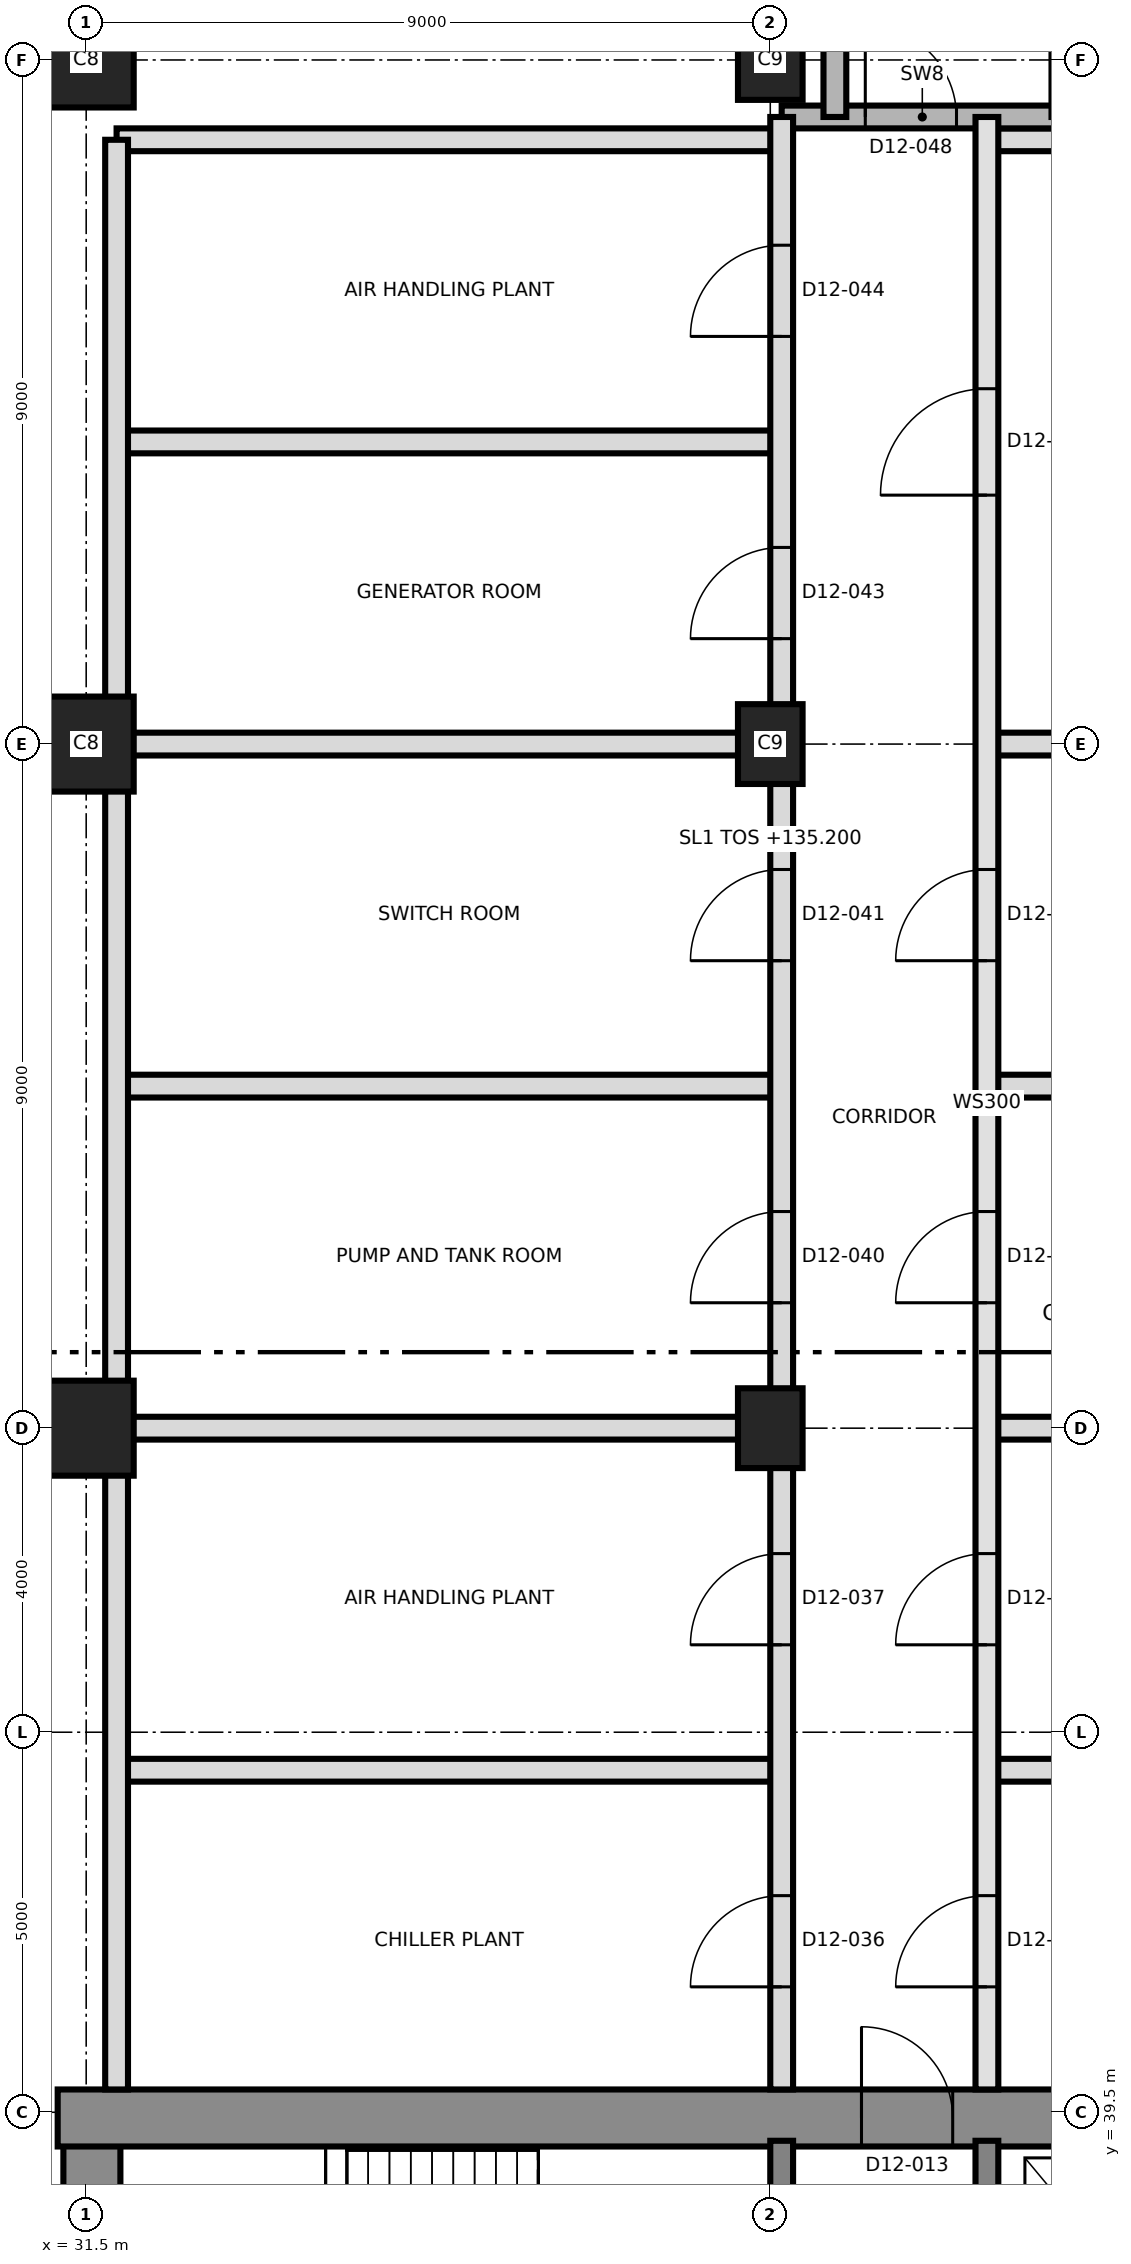
"""IFC4 building model, lengths in metres.
Left out: names, types, materials, properties, quantities, classifications, styles, units other than length and angle.
Written with IfcOpenShell. Run it as: python <this file> out.ifc"""

import sys

from ifc_helpers import new_model, si_unit, direction, frame, frame_2d, origin, origin_2d, place, context, subcontext, project, spatial, rectangle, extrude, element, fill, save


model = new_model("IFC4")
c1 = context("Model", 3, precision=1e-05, world=origin(), true_north=direction((0.0, 1.0)))
c2 = subcontext(c1, "Body", "Model", "MODEL_VIEW")
j1 = project(units=[si_unit("LENGTHUNIT", "METRE"), si_unit("PLANEANGLEUNIT", "RADIAN")], contexts=[c1])
p1 = place(None, origin())
s1 = spatial("IfcSite", under=j1, at=p1, CompositionType="ELEMENT")
p2 = place(p1, origin())
s2 = spatial("IfcBuilding", under=s1, at=p2, CompositionType="ELEMENT")
p3 = place(p2, frame((0.0, 0.0, 135.2)))
s3 = spatial("IfcBuildingStorey", under=s2, at=p3, CompositionType="ELEMENT", Elevation=135.2)
p4 = place(p3, frame((31.575, 21.875, 0.0), z_axis=(0.0, 0.0, 1.0), x_axis=(0.0, 1.0, 0.0)))
e1 = element("IfcWall", 1, at=p4, inside=s3, PredefinedType="SHEAR", context=c2, shape_type="SweptSolid", body=[
    extrude(rectangle(XDim=17.25, YDim=0.75, at=frame_2d((8.625, 0.0))), origin(), (0.0, 0.0, 1.0), 7.0),
])
p5 = place(p3, frame((31.125, 39.425, 0.0), z_axis=(0.0, 0.0, 1.0), x_axis=(1.0, 0.0, 0.0)))
e2 = element("IfcWall", 2, at=p5, inside=s3, PredefinedType="SHEAR", context=c2, shape_type="SweptSolid", body=[
    extrude(rectangle(XDim=27.0, YDim=0.75, at=frame_2d((13.5, 0.0))), origin(), (0.0, 0.0, 1.0), 7.0),
])
p6 = place(p5, frame((10.575, 0.0, 0.0)))
e3 = element("IfcOpeningElement", 3, at=p6, cuts=e2, PredefinedType="OPENING", context=c2, shape_type="SweptSolid", body=[
    extrude(rectangle(XDim=1.2, YDim=2.1, at=frame_2d((0.6, 1.05))), frame((0.0, 0.385, 0.0), z_axis=(0.0, -1.0, 0.0), x_axis=(1.0, 0.0, 0.0)), (0.0, 0.0, 1.0), 0.77),
])
for number, where, z_axis, x_axis in (
    (4, (40.65, 33.5, 0.0), (0.0, 0.0, 1.0), (0.0, 1.0, 0.0)),
    (5, (43.35, 33.5, 0.0), (0.0, 0.0, 1.0), (0.0, 1.0, 0.0)),
):
    element("IfcWall", number, at=place(p3, frame(where, z_axis=z_axis, x_axis=x_axis)), inside=s3, PredefinedType="SHEAR", context=c2, shape_type="SweptSolid", body=[
        extrude(rectangle(XDim=5.625, YDim=0.3, at=frame_2d((2.812, 0.0))), origin(), (0.0, 0.0, 1.0), 7.0),
    ])
p7 = place(p3, frame((31.5, 48.5, 0.0), z_axis=(0.0, 0.0, 1.0), x_axis=(1.0, 0.0, 0.0)))
e6 = element("IfcColumn", 6, at=p7, inside=s3, PredefinedType="COLUMN", context=c2, shape_type="SweptSolid", body=[
    extrude(rectangle(XDim=1.25, YDim=1.25, at=origin_2d()), origin(), (0.0, 0.0, 1.0), 7.0),
])
p8 = place(p3, frame((40.5, 48.5, 0.0), z_axis=(0.0, 0.0, 1.0), x_axis=(0.0, 1.0, 0.0)))
e7 = element("IfcColumn", 7, at=p8, inside=s3, PredefinedType="COLUMN", context=c2, shape_type="SweptSolid", body=[
    extrude(rectangle(XDim=1.05, YDim=0.85, at=origin_2d()), origin(), (0.0, 0.0, 1.0), 7.0),
])
p9 = place(p3, frame((31.5, 57.5, 0.0), z_axis=(0.0, 0.0, 1.0), x_axis=(1.0, 0.0, 0.0)))
e8 = element("IfcColumn", 8, at=p9, inside=s3, PredefinedType="COLUMN", context=c2, shape_type="SweptSolid", body=[
    extrude(rectangle(XDim=1.25, YDim=1.25, at=origin_2d()), origin(), (0.0, 0.0, 1.0), 7.0),
])
p10 = place(p3, frame((40.5, 57.5, 0.0), z_axis=(0.0, 0.0, 1.0), x_axis=(0.0, 1.0, 0.0)))
e9 = element("IfcColumn", 9, at=p10, inside=s3, PredefinedType="COLUMN", context=c2, shape_type="SweptSolid", body=[
    extrude(rectangle(XDim=1.05, YDim=0.85, at=origin_2d()), origin(), (0.0, 0.0, 1.0), 7.0),
])
p11 = place(p3, frame((31.5, 66.5, 0.0), z_axis=(0.0, 0.0, 1.0), x_axis=(1.0, 0.0, 0.0)))
e10 = element("IfcColumn", 10, at=p11, inside=s3, PredefinedType="COLUMN", context=c2, shape_type="SweptSolid", body=[
    extrude(rectangle(XDim=1.25, YDim=1.25, at=origin_2d()), origin(), (0.0, 0.0, 1.0), 7.0),
])
p12 = place(p3, frame((40.5, 66.5, 0.0), z_axis=(0.0, 0.0, 1.0), x_axis=(0.0, 1.0, 0.0)))
e11 = element("IfcColumn", 11, at=p12, inside=s3, PredefinedType="COLUMN", context=c2, shape_type="SweptSolid", body=[
    extrude(rectangle(XDim=1.05, YDim=0.85, at=origin_2d()), origin(), (0.0, 0.0, 1.0), 7.0),
])
p13 = place(p3, frame((31.9, 44.0, 0.0), z_axis=(0.0, 0.0, 1.0), x_axis=(1.0, 0.0, 0.0)))
e12 = element("IfcWall", 12, at=p13, inside=s3, PredefinedType="PARTITIONING", context=c2, shape_type="SweptSolid", body=[
    extrude(rectangle(XDim=8.75, YDim=0.3, at=frame_2d((4.375, 0.0))), origin(), (0.0, 0.0, 1.0), 6.7),
])
p14 = place(p3, frame((43.35, 44.0, 0.0), z_axis=(0.0, 0.0, 1.0), x_axis=(1.0, 0.0, 0.0)))
e13 = element("IfcWall", 13, at=p14, inside=s3, PredefinedType="PARTITIONING", context=c2, shape_type="SweptSolid", body=[
    extrude(rectangle(XDim=6.856, YDim=0.3, at=frame_2d((3.428, 0.0))), origin(), (0.0, 0.0, 1.0), 6.7),
])
p15 = place(p3, frame((31.9, 48.5, 0.0), z_axis=(0.0, 0.0, 1.0), x_axis=(1.0, 0.0, 0.0)))
e14 = element("IfcWall", 14, at=p15, inside=s3, PredefinedType="PARTITIONING", context=c2, shape_type="SweptSolid", body=[
    extrude(rectangle(XDim=8.75, YDim=0.3, at=frame_2d((4.375, 0.0))), origin(), (0.0, 0.0, 1.0), 6.7),
])
p16 = place(p3, frame((43.35, 48.5, 0.0), z_axis=(0.0, 0.0, 1.0), x_axis=(1.0, 0.0, 0.0)))
e15 = element("IfcWall", 15, at=p16, inside=s3, PredefinedType="PARTITIONING", context=c2, shape_type="SweptSolid", body=[
    extrude(rectangle(XDim=5.838, YDim=0.3, at=frame_2d((2.919, 0.0))), origin(), (0.0, 0.0, 1.0), 6.7),
])
p17 = place(p3, frame((31.9, 53.0, 0.0), z_axis=(0.0, 0.0, 1.0), x_axis=(1.0, 0.0, 0.0)))
e16 = element("IfcWall", 16, at=p17, inside=s3, PredefinedType="PARTITIONING", context=c2, shape_type="SweptSolid", body=[
    extrude(rectangle(XDim=8.75, YDim=0.3, at=frame_2d((4.375, 0.0))), origin(), (0.0, 0.0, 1.0), 6.7),
])
p18 = place(p3, frame((43.35, 53.0, 0.0), z_axis=(0.0, 0.0, 1.0), x_axis=(1.0, 0.0, 0.0)))
e17 = element("IfcWall", 17, at=p18, inside=s3, PredefinedType="PARTITIONING", context=c2, shape_type="SweptSolid", body=[
    extrude(rectangle(XDim=5.75, YDim=0.3, at=frame_2d((2.875, 0.0))), origin(), (0.0, 0.0, 1.0), 6.7),
])
p19 = place(p3, frame((31.9, 57.5, 0.0), z_axis=(0.0, 0.0, 1.0), x_axis=(1.0, 0.0, 0.0)))
e18 = element("IfcWall", 18, at=p19, inside=s3, PredefinedType="PARTITIONING", context=c2, shape_type="SweptSolid", body=[
    extrude(rectangle(XDim=8.75, YDim=0.3, at=frame_2d((4.375, 0.0))), origin(), (0.0, 0.0, 1.0), 6.7),
])
p20 = place(p3, frame((43.35, 57.5, 0.0), z_axis=(0.0, 0.0, 1.0), x_axis=(1.0, 0.0, 0.0)))
e19 = element("IfcWall", 19, at=p20, inside=s3, PredefinedType="PARTITIONING", context=c2, shape_type="SweptSolid", body=[
    extrude(rectangle(XDim=5.75, YDim=0.3, at=frame_2d((2.875, 0.0))), origin(), (0.0, 0.0, 1.0), 6.7),
])
for number, where, z_axis, x_axis in (
    (20, (31.9, 61.475, 0.0), (0.0, 0.0, 1.0), (1.0, 0.0, 0.0)),
    (21, (31.9, 65.45, 0.0), (0.0, 0.0, 1.0), (1.0, 0.0, 0.0)),
):
    element("IfcWall", number, at=place(p3, frame(where, z_axis=z_axis, x_axis=x_axis)), inside=s3, PredefinedType="PARTITIONING", context=c2, shape_type="SweptSolid", body=[
        extrude(rectangle(XDim=8.75, YDim=0.3, at=frame_2d((4.375, 0.0))), origin(), (0.0, 0.0, 1.0), 6.7),
    ])
p21 = place(p3, frame((43.35, 65.45, 0.0), z_axis=(0.0, 0.0, 1.0), x_axis=(1.0, 0.0, 0.0)))
e22 = element("IfcWall", 22, at=p21, inside=s3, PredefinedType="PARTITIONING", context=c2, shape_type="SweptSolid", body=[
    extrude(rectangle(XDim=5.75, YDim=0.3, at=frame_2d((2.875, 0.0))), origin(), (0.0, 0.0, 1.0), 6.7),
])
p22 = place(p3, frame((40.65, 65.75, 0.0), z_axis=(0.0, 0.0, 1.0), x_axis=(1.0, 0.0, 0.0)))
e23 = element("IfcWall", 23, at=p22, inside=s3, PredefinedType="SHEAR", context=c2, shape_type="SweptSolid", body=[
    extrude(rectangle(XDim=3.7, YDim=0.3, at=frame_2d((1.85, 0.0))), origin(), (0.0, 0.0, 1.0), 6.7),
])
p23 = place(p22, frame((1.1, 0.0, 0.0)))
e24 = element("IfcOpeningElement", 24, at=p23, cuts=e23, PredefinedType="OPENING", context=c2, shape_type="SweptSolid", body=[
    extrude(rectangle(XDim=1.2, YDim=2.1, at=frame_2d((0.6, 1.05))), frame((0.0, 0.16, 0.0), z_axis=(0.0, -1.0, 0.0), x_axis=(1.0, 0.0, 0.0)), (0.0, 0.0, 1.0), 0.32),
])
p24 = place(p3, frame((31.9, 39.8, 0.0), z_axis=(0.0, 0.0, 1.0), x_axis=(0.0, 1.0, 0.0)))
e25 = element("IfcWall", 25, at=p24, inside=s3, PredefinedType="PARTITIONING", context=c2, shape_type="SweptSolid", body=[
    extrude(rectangle(XDim=25.65, YDim=0.3, at=frame_2d((12.825, 0.0))), origin(), (0.0, 0.0, 1.0), 6.7),
])
p25 = place(p3, frame((40.65, 39.8, 0.0), z_axis=(0.0, 0.0, 1.0), x_axis=(0.0, 1.0, 0.0)))
e26 = element("IfcWall", 26, at=p25, inside=s3, PredefinedType="PARTITIONING", context=c2, shape_type="SweptSolid", body=[
    extrude(rectangle(XDim=25.95, YDim=0.3, at=frame_2d((12.975, 0.0))), origin(), (0.0, 0.0, 1.0), 6.7),
])
p26 = place(p25, frame((1.35, 0.0, 0.0)))
e27 = element("IfcOpeningElement", 27, at=p26, cuts=e26, PredefinedType="OPENING", context=c2, shape_type="SweptSolid", body=[
    extrude(rectangle(XDim=1.2, YDim=2.1, at=frame_2d((0.6, 1.05))), frame((0.0, 0.16, 0.0), z_axis=(0.0, -1.0, 0.0), x_axis=(1.0, 0.0, 0.0)), (0.0, 0.0, 1.0), 0.32),
])
p27 = place(p25, frame((5.85, 0.0, 0.0)))
e28 = element("IfcOpeningElement", 28, at=p27, cuts=e26, PredefinedType="OPENING", context=c2, shape_type="SweptSolid", body=[
    extrude(rectangle(XDim=1.2, YDim=2.1, at=frame_2d((0.6, 1.05))), frame((0.0, 0.16, 0.0), z_axis=(0.0, -1.0, 0.0), x_axis=(1.0, 0.0, 0.0)), (0.0, 0.0, 1.0), 0.32),
])
p28 = place(p25, frame((10.35, 0.0, 0.0)))
e29 = element("IfcOpeningElement", 29, at=p28, cuts=e26, PredefinedType="OPENING", context=c2, shape_type="SweptSolid", body=[
    extrude(rectangle(XDim=1.2, YDim=2.1, at=frame_2d((0.6, 1.05))), frame((0.0, 0.16, 0.0), z_axis=(0.0, -1.0, 0.0), x_axis=(1.0, 0.0, 0.0)), (0.0, 0.0, 1.0), 0.32),
])
p29 = place(p25, frame((14.85, 0.0, 0.0)))
e30 = element("IfcOpeningElement", 30, at=p29, cuts=e26, PredefinedType="OPENING", context=c2, shape_type="SweptSolid", body=[
    extrude(rectangle(XDim=1.2, YDim=2.1, at=frame_2d((0.6, 1.05))), frame((0.0, 0.16, 0.0), z_axis=(0.0, -1.0, 0.0), x_axis=(1.0, 0.0, 0.0)), (0.0, 0.0, 1.0), 0.32),
])
p30 = place(p25, frame((19.087, 0.0, 0.0)))
e31 = element("IfcOpeningElement", 31, at=p30, cuts=e26, PredefinedType="OPENING", context=c2, shape_type="SweptSolid", body=[
    extrude(rectangle(XDim=1.2, YDim=2.1, at=frame_2d((0.6, 1.05))), frame((0.0, 0.16, 0.0), z_axis=(0.0, -1.0, 0.0), x_axis=(1.0, 0.0, 0.0)), (0.0, 0.0, 1.0), 0.32),
])
p31 = place(p25, frame((23.063, 0.0, 0.0)))
e32 = element("IfcOpeningElement", 32, at=p31, cuts=e26, PredefinedType="OPENING", context=c2, shape_type="SweptSolid", body=[
    extrude(rectangle(XDim=1.2, YDim=2.1, at=frame_2d((0.6, 1.05))), frame((0.0, 0.16, 0.0), z_axis=(0.0, -1.0, 0.0), x_axis=(1.0, 0.0, 0.0)), (0.0, 0.0, 1.0), 0.32),
])
p32 = place(p3, frame((41.35, 65.75, 0.0), z_axis=(0.0, 0.0, 1.0), x_axis=(0.0, 1.0, 0.0)))
e33 = element("IfcWall", 33, at=p32, inside=s3, PredefinedType="SHEAR", context=c2, shape_type="SweptSolid", body=[
    extrude(rectangle(XDim=8.85, YDim=0.3, at=frame_2d((4.425, 0.0))), origin(), (0.0, 0.0, 1.0), 6.7),
])
p33 = place(p3, frame((43.35, 39.8, 0.0), z_axis=(0.0, 0.0, 1.0), x_axis=(0.0, 1.0, 0.0)))
e34 = element("IfcWall", 34, at=p33, inside=s3, PredefinedType="SOLIDWALL", context=c2, shape_type="SweptSolid", body=[
    extrude(rectangle(XDim=25.95, YDim=0.3, at=frame_2d((12.975, 0.0))), origin(), (0.0, 0.0, 1.0), 6.7),
])
p34 = place(p33, frame((1.35, 0.0, 0.0)))
e35 = element("IfcOpeningElement", 35, at=p34, cuts=e34, PredefinedType="OPENING", context=c2, shape_type="SweptSolid", body=[
    extrude(rectangle(XDim=1.2, YDim=2.1, at=frame_2d((0.6, 1.05))), frame((0.0, 0.16, 0.0), z_axis=(0.0, -1.0, 0.0), x_axis=(1.0, 0.0, 0.0)), (0.0, 0.0, 1.0), 0.32),
])
p35 = place(p33, frame((5.85, 0.0, 0.0)))
e36 = element("IfcOpeningElement", 36, at=p35, cuts=e34, PredefinedType="OPENING", context=c2, shape_type="SweptSolid", body=[
    extrude(rectangle(XDim=1.2, YDim=2.1, at=frame_2d((0.6, 1.05))), frame((0.0, 0.16, 0.0), z_axis=(0.0, -1.0, 0.0), x_axis=(1.0, 0.0, 0.0)), (0.0, 0.0, 1.0), 0.32),
])
p36 = place(p33, frame((10.35, 0.0, 0.0)))
e37 = element("IfcOpeningElement", 37, at=p36, cuts=e34, PredefinedType="OPENING", context=c2, shape_type="SweptSolid", body=[
    extrude(rectangle(XDim=1.2, YDim=2.1, at=frame_2d((0.6, 1.05))), frame((0.0, 0.16, 0.0), z_axis=(0.0, -1.0, 0.0), x_axis=(1.0, 0.0, 0.0)), (0.0, 0.0, 1.0), 0.32),
])
p37 = place(p33, frame((14.85, 0.0, 0.0)))
e38 = element("IfcOpeningElement", 38, at=p37, cuts=e34, PredefinedType="OPENING", context=c2, shape_type="SweptSolid", body=[
    extrude(rectangle(XDim=1.2, YDim=2.1, at=frame_2d((0.6, 1.05))), frame((0.0, 0.16, 0.0), z_axis=(0.0, -1.0, 0.0), x_axis=(1.0, 0.0, 0.0)), (0.0, 0.0, 1.0), 0.32),
])
p38 = place(p33, frame((20.975, 0.0, 0.0)))
e39 = element("IfcOpeningElement", 39, at=p38, cuts=e34, PredefinedType="OPENING", context=c2, shape_type="SweptSolid", body=[
    extrude(rectangle(XDim=1.4, YDim=2.1, at=frame_2d((0.7, 1.05))), frame((0.0, 0.16, 0.0), z_axis=(0.0, -1.0, 0.0), x_axis=(1.0, 0.0, 0.0)), (0.0, 0.0, 1.0), 0.32),
])
p39 = place(p6, origin())
e40 = element("IfcDoor", 40, at=p39, inside=s3, OperationType="SINGLE_SWING_RIGHT", PredefinedType="DOOR", context=c2, shape_type="SweptSolid", body=[
    extrude(rectangle(XDim=1.2, YDim=2.1, at=frame_2d((0.6, 1.05))), frame((0.0, 0.025, 0.0), z_axis=(0.0, -1.0, 0.0), x_axis=(1.0, 0.0, 0.0)), (0.0, 0.0, 1.0), 0.05),
])
fill(e3, e40)
p40 = place(p34, origin())
e41 = element("IfcDoor", 41, at=p40, inside=s3, OperationType="SINGLE_SWING_LEFT", PredefinedType="DOOR", context=c2, shape_type="SweptSolid", body=[
    extrude(rectangle(XDim=1.2, YDim=2.1, at=frame_2d((0.6, 1.05))), frame((0.0, 0.025, 0.0), z_axis=(0.0, -1.0, 0.0), x_axis=(1.0, 0.0, 0.0)), (0.0, 0.0, 1.0), 0.05),
])
fill(e35, e41)
p41 = place(p35, origin())
e42 = element("IfcDoor", 42, at=p41, inside=s3, OperationType="SINGLE_SWING_LEFT", PredefinedType="DOOR", context=c2, shape_type="SweptSolid", body=[
    extrude(rectangle(XDim=1.2, YDim=2.1, at=frame_2d((0.6, 1.05))), frame((0.0, 0.025, 0.0), z_axis=(0.0, -1.0, 0.0), x_axis=(1.0, 0.0, 0.0)), (0.0, 0.0, 1.0), 0.05),
])
fill(e36, e42)
p42 = place(p26, origin())
e43 = element("IfcDoor", 43, at=p42, inside=s3, OperationType="SINGLE_SWING_RIGHT", PredefinedType="DOOR", context=c2, shape_type="SweptSolid", body=[
    extrude(rectangle(XDim=1.2, YDim=2.1, at=frame_2d((0.6, 1.05))), frame((0.0, 0.025, 0.0), z_axis=(0.0, -1.0, 0.0), x_axis=(1.0, 0.0, 0.0)), (0.0, 0.0, 1.0), 0.05),
])
fill(e27, e43)
p43 = place(p27, origin())
e44 = element("IfcDoor", 44, at=p43, inside=s3, OperationType="SINGLE_SWING_LEFT", PredefinedType="DOOR", context=c2, shape_type="SweptSolid", body=[
    extrude(rectangle(XDim=1.2, YDim=2.1, at=frame_2d((0.6, 1.05))), frame((0.0, 0.025, 0.0), z_axis=(0.0, -1.0, 0.0), x_axis=(1.0, 0.0, 0.0)), (0.0, 0.0, 1.0), 0.05),
])
fill(e28, e44)
p44 = place(p36, origin())
e45 = element("IfcDoor", 45, at=p44, inside=s3, OperationType="SINGLE_SWING_LEFT", PredefinedType="DOOR", context=c2, shape_type="SweptSolid", body=[
    extrude(rectangle(XDim=1.2, YDim=2.1, at=frame_2d((0.6, 1.05))), frame((0.0, 0.025, 0.0), z_axis=(0.0, -1.0, 0.0), x_axis=(1.0, 0.0, 0.0)), (0.0, 0.0, 1.0), 0.05),
])
fill(e37, e45)
p45 = place(p37, origin())
e46 = element("IfcDoor", 46, at=p45, inside=s3, OperationType="SINGLE_SWING_RIGHT", PredefinedType="DOOR", context=c2, shape_type="SweptSolid", body=[
    extrude(rectangle(XDim=1.2, YDim=2.1, at=frame_2d((0.6, 1.05))), frame((0.0, 0.025, 0.0), z_axis=(0.0, -1.0, 0.0), x_axis=(1.0, 0.0, 0.0)), (0.0, 0.0, 1.0), 0.05),
])
fill(e38, e46)
p46 = place(p28, origin())
e47 = element("IfcDoor", 47, at=p46, inside=s3, OperationType="SINGLE_SWING_LEFT", PredefinedType="DOOR", context=c2, shape_type="SweptSolid", body=[
    extrude(rectangle(XDim=1.2, YDim=2.1, at=frame_2d((0.6, 1.05))), frame((0.0, 0.025, 0.0), z_axis=(0.0, -1.0, 0.0), x_axis=(1.0, 0.0, 0.0)), (0.0, 0.0, 1.0), 0.05),
])
fill(e29, e47)
p47 = place(p29, origin())
e48 = element("IfcDoor", 48, at=p47, inside=s3, OperationType="SINGLE_SWING_LEFT", PredefinedType="DOOR", context=c2, shape_type="SweptSolid", body=[
    extrude(rectangle(XDim=1.2, YDim=2.1, at=frame_2d((0.6, 1.05))), frame((0.0, 0.025, 0.0), z_axis=(0.0, -1.0, 0.0), x_axis=(1.0, 0.0, 0.0)), (0.0, 0.0, 1.0), 0.05),
])
fill(e30, e48)
p48 = place(p38, origin())
e49 = element("IfcDoor", 49, at=p48, inside=s3, OperationType="SINGLE_SWING_LEFT", PredefinedType="DOOR", context=c2, shape_type="SweptSolid", body=[
    extrude(rectangle(XDim=1.4, YDim=2.1, at=frame_2d((0.7, 1.05))), frame((0.0, 0.025, 0.0), z_axis=(0.0, -1.0, 0.0), x_axis=(1.0, 0.0, 0.0)), (0.0, 0.0, 1.0), 0.05),
])
fill(e39, e49)
p49 = place(p30, origin())
e50 = element("IfcDoor", 50, at=p49, inside=s3, OperationType="SINGLE_SWING_RIGHT", PredefinedType="DOOR", context=c2, shape_type="SweptSolid", body=[
    extrude(rectangle(XDim=1.2, YDim=2.1, at=frame_2d((0.6, 1.05))), frame((0.0, 0.025, 0.0), z_axis=(0.0, -1.0, 0.0), x_axis=(1.0, 0.0, 0.0)), (0.0, 0.0, 1.0), 0.05),
])
fill(e31, e50)
p50 = place(p31, origin())
e51 = element("IfcDoor", 51, at=p50, inside=s3, OperationType="SINGLE_SWING_LEFT", PredefinedType="DOOR", context=c2, shape_type="SweptSolid", body=[
    extrude(rectangle(XDim=1.2, YDim=2.1, at=frame_2d((0.6, 1.05))), frame((0.0, 0.025, 0.0), z_axis=(0.0, -1.0, 0.0), x_axis=(1.0, 0.0, 0.0)), (0.0, 0.0, 1.0), 0.05),
])
fill(e32, e51)
p51 = place(p23, origin())
e52 = element("IfcDoor", 52, at=p51, inside=s3, OperationType="SINGLE_SWING_RIGHT", PredefinedType="DOOR", context=c2, shape_type="SweptSolid", body=[
    extrude(rectangle(XDim=1.2, YDim=2.1, at=frame_2d((0.6, 1.05))), frame((0.0, 0.025, 0.0), z_axis=(0.0, -1.0, 0.0), x_axis=(1.0, 0.0, 0.0)), (0.0, 0.0, 1.0), 0.05),
])
fill(e24, e52)
save(model, sys.argv[1])
